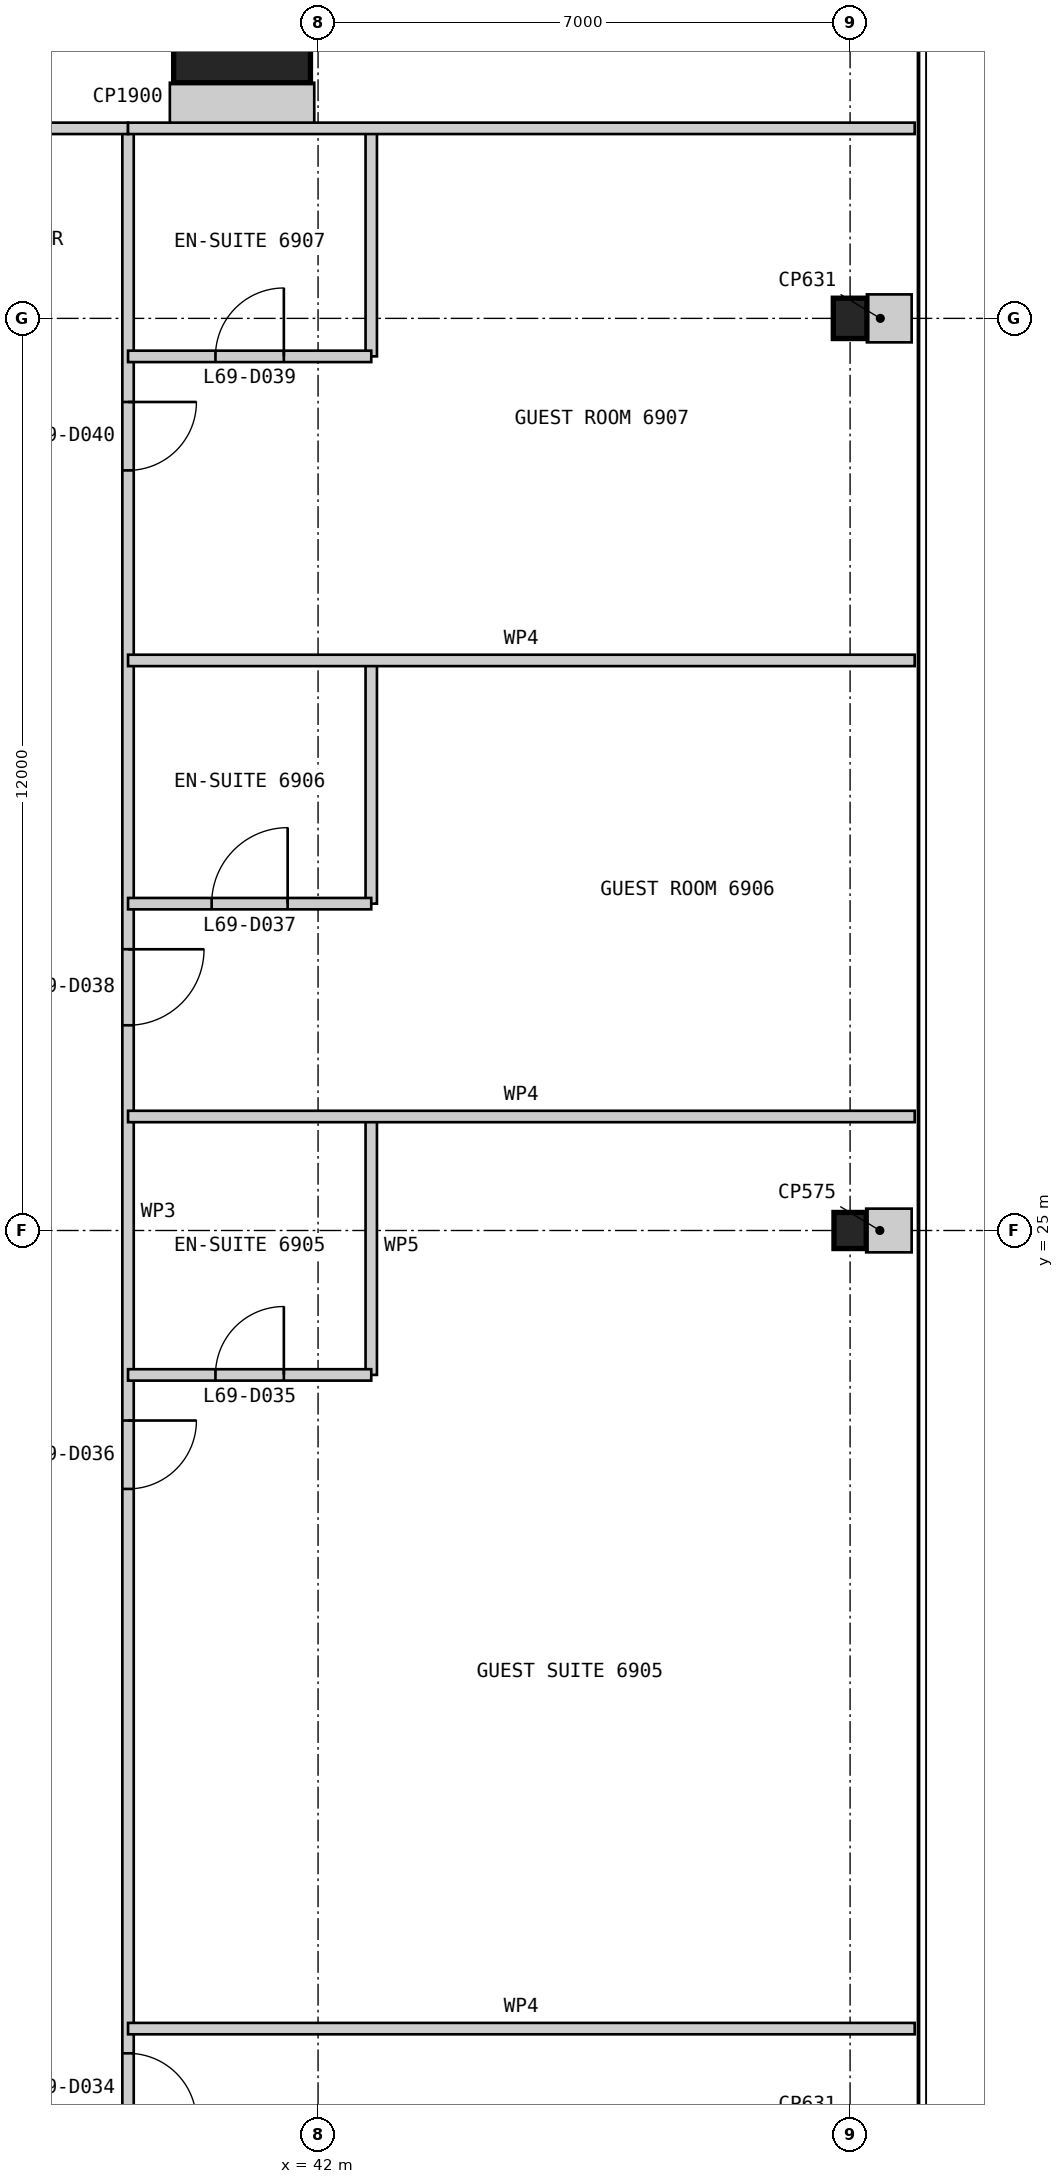
"""IFC4 building model, lengths in metres.
Left out: names, types, materials, properties, quantities, classifications, styles, units other than length and angle.
Written with IfcOpenShell. Run it as: python <this file> out.ifc"""

import sys

from ifc_helpers import new_model, si_unit, direction, frame, frame_2d, origin, origin_2d, place, context, subcontext, project, spatial, rectangle, i_section, extrude, element, fill, save


model = new_model("IFC4")
c1 = context("Model", 3, precision=1e-05, world=origin(), true_north=direction((0.0, 1.0)))
c2 = subcontext(c1, "Body", "Model", "MODEL_VIEW")
j1 = project(units=[si_unit("LENGTHUNIT", "METRE"), si_unit("PLANEANGLEUNIT", "RADIAN")], contexts=[c1])
p1 = place(None, origin())
s1 = spatial("IfcSite", under=j1, at=p1, CompositionType="ELEMENT")
p2 = place(p1, origin())
s2 = spatial("IfcBuilding", under=s1, at=p2, CompositionType="ELEMENT")
p3 = place(p2, frame((0.0, 0.0, 286.6)))
s3 = spatial("IfcBuildingStorey", under=s2, at=p3, CompositionType="ELEMENT", Elevation=286.6)
p4 = place(p3, frame((41.0, 41.0, 0.0), z_axis=(0.0, 0.0, 1.0), x_axis=(1.0, 0.0, 0.0)))
e1 = element("IfcColumn", 1, at=p4, inside=s3, PredefinedType="COLUMN", context=c2, shape_type="SweptSolid", body=[
    extrude(rectangle(XDim=1.8, YDim=1.8, at=origin_2d()), origin(), (0.0, 0.0, 1.0), 3.4),
])
p5 = place(p3, frame((49.0, 25.0, 0.0), z_axis=(0.0, 0.0, 1.0), x_axis=(1.0, 0.0, 0.0)))
e2 = element("IfcColumn", 2, at=p5, inside=s3, PredefinedType="COLUMN", context=c2, shape_type="SweptSolid", body=[
    extrude(i_section(OverallWidth=0.424, OverallDepth=0.475, WebThickness=0.048, FlangeThickness=0.077, at=origin_2d()), origin(), (0.0, 0.0, 1.0), 3.4),
])
p6 = place(p3, frame((49.0, 37.0, 0.0), z_axis=(0.0, 0.0, 1.0), x_axis=(1.0, 0.0, 0.0)))
e3 = element("IfcColumn", 3, at=p6, inside=s3, PredefinedType="COLUMN", context=c2, shape_type="SweptSolid", body=[
    extrude(i_section(OverallWidth=0.442, OverallDepth=0.531, WebThickness=0.066, FlangeThickness=0.106, at=origin_2d()), origin(), (0.0, 0.0, 1.0), 3.4),
])
p7 = place(p3, frame((39.5, 10.5, 0.0), z_axis=(0.0, 0.0, 1.0), x_axis=(0.0, 1.0, 0.0)))
e4 = element("IfcWall", 4, at=p7, inside=s3, PredefinedType="PARTITIONING", context=c2, shape_type="SweptSolid", body=[
    extrude(rectangle(XDim=29.0, YDim=0.15, at=frame_2d((14.5, 0.0))), origin(), (0.0, 0.0, 1.0), 3.25),
])
p8 = place(p7, frame((2.775, 0.0, 0.0)))
e5 = element("IfcOpeningElement", 5, at=p8, cuts=e4, PredefinedType="OPENING", context=c2, shape_type="SweptSolid", body=[
    extrude(rectangle(XDim=0.9, YDim=2.1, at=frame_2d((0.45, 1.05))), frame((0.0, 0.085, 0.0), z_axis=(0.0, -1.0, 0.0), x_axis=(1.0, 0.0, 0.0)), (0.0, 0.0, 1.0), 0.17),
])
p9 = place(p7, frame((11.1, 0.0, 0.0)))
e6 = element("IfcOpeningElement", 6, at=p9, cuts=e4, PredefinedType="OPENING", context=c2, shape_type="SweptSolid", body=[
    extrude(rectangle(XDim=0.9, YDim=2.1, at=frame_2d((0.45, 1.05))), frame((0.0, 0.085, 0.0), z_axis=(0.0, -1.0, 0.0), x_axis=(1.0, 0.0, 0.0)), (0.0, 0.0, 1.0), 0.17),
])
p10 = place(p7, frame((17.2, 0.0, 0.0)))
e7 = element("IfcOpeningElement", 7, at=p10, cuts=e4, PredefinedType="OPENING", context=c2, shape_type="SweptSolid", body=[
    extrude(rectangle(XDim=1.0, YDim=2.1, at=frame_2d((0.5, 1.05))), frame((0.0, 0.085, 0.0), z_axis=(0.0, -1.0, 0.0), x_axis=(1.0, 0.0, 0.0)), (0.0, 0.0, 1.0), 0.17),
])
p11 = place(p7, frame((24.5, 0.0, 0.0)))
e8 = element("IfcOpeningElement", 8, at=p11, cuts=e4, PredefinedType="OPENING", context=c2, shape_type="SweptSolid", body=[
    extrude(rectangle(XDim=0.9, YDim=2.1, at=frame_2d((0.45, 1.05))), frame((0.0, 0.085, 0.0), z_axis=(0.0, -1.0, 0.0), x_axis=(1.0, 0.0, 0.0)), (0.0, 0.0, 1.0), 0.17),
])
p12 = place(p3, frame((49.85, 14.5, 0.0), z_axis=(0.0, 0.0, 1.0), x_axis=(-1.0, 0.0, 0.0)))
e9 = element("IfcWall", 9, at=p12, inside=s3, PredefinedType="PARTITIONING", context=c2, shape_type="SweptSolid", body=[
    extrude(rectangle(XDim=10.35, YDim=0.15, at=frame_2d((5.175, 0.0))), origin(), (0.0, 0.0, 1.0), 3.25),
])
p13 = place(p3, frame((42.7, 23.1, 0.0), z_axis=(0.0, 0.0, 1.0), x_axis=(0.0, 1.0, 0.0)))
e10 = element("IfcWall", 10, at=p13, inside=s3, PredefinedType="PARTITIONING", context=c2, shape_type="SweptSolid", body=[
    extrude(rectangle(XDim=3.4, YDim=0.15, at=frame_2d((1.7, 0.0))), origin(), (0.0, 0.0, 1.0), 3.25),
])
p14 = place(p3, frame((42.7, 23.1, 0.0), z_axis=(0.0, 0.0, 1.0), x_axis=(-1.0, 0.0, 0.0)))
e11 = element("IfcWall", 11, at=p14, inside=s3, PredefinedType="PARTITIONING", context=c2, shape_type="SweptSolid", body=[
    extrude(rectangle(XDim=3.2, YDim=0.15, at=frame_2d((1.6, 0.0))), origin(), (0.0, 0.0, 1.0), 3.25),
])
p15 = place(p14, frame((1.15, 0.0, 0.0)))
e12 = element("IfcOpeningElement", 12, at=p15, cuts=e11, PredefinedType="OPENING", context=c2, shape_type="SweptSolid", body=[
    extrude(rectangle(XDim=0.9, YDim=2.1, at=frame_2d((0.45, 1.05))), frame((0.0, 0.085, 0.0), z_axis=(0.0, -1.0, 0.0), x_axis=(1.0, 0.0, 0.0)), (0.0, 0.0, 1.0), 0.17),
])
p16 = place(p3, frame((49.85, 26.5, 0.0), z_axis=(0.0, 0.0, 1.0), x_axis=(-1.0, 0.0, 0.0)))
e13 = element("IfcWall", 13, at=p16, inside=s3, PredefinedType="PARTITIONING", context=c2, shape_type="SweptSolid", body=[
    extrude(rectangle(XDim=10.35, YDim=0.15, at=frame_2d((5.175, 0.0))), origin(), (0.0, 0.0, 1.0), 3.25),
])
p17 = place(p3, frame((42.7, 29.3, 0.0), z_axis=(0.0, 0.0, 1.0), x_axis=(0.0, 1.0, 0.0)))
e14 = element("IfcWall", 14, at=p17, inside=s3, PredefinedType="PARTITIONING", context=c2, shape_type="SweptSolid", body=[
    extrude(rectangle(XDim=3.2, YDim=0.15, at=frame_2d((1.6, 0.0))), origin(), (0.0, 0.0, 1.0), 3.25),
])
p18 = place(p3, frame((42.7, 29.3, 0.0), z_axis=(0.0, 0.0, 1.0), x_axis=(-1.0, 0.0, 0.0)))
e15 = element("IfcWall", 15, at=p18, inside=s3, PredefinedType="PARTITIONING", context=c2, shape_type="SweptSolid", body=[
    extrude(rectangle(XDim=3.2, YDim=0.15, at=frame_2d((1.6, 0.0))), origin(), (0.0, 0.0, 1.0), 3.25),
])
p19 = place(p18, frame((1.1, 0.0, 0.0)))
e16 = element("IfcOpeningElement", 16, at=p19, cuts=e15, PredefinedType="OPENING", context=c2, shape_type="SweptSolid", body=[
    extrude(rectangle(XDim=1.0, YDim=2.1, at=frame_2d((0.5, 1.05))), frame((0.0, 0.085, 0.0), z_axis=(0.0, -1.0, 0.0), x_axis=(1.0, 0.0, 0.0)), (0.0, 0.0, 1.0), 0.17),
])
p20 = place(p3, frame((49.85, 32.5, 0.0), z_axis=(0.0, 0.0, 1.0), x_axis=(-1.0, 0.0, 0.0)))
e17 = element("IfcWall", 17, at=p20, inside=s3, PredefinedType="PARTITIONING", context=c2, shape_type="SweptSolid", body=[
    extrude(rectangle(XDim=10.35, YDim=0.15, at=frame_2d((5.175, 0.0))), origin(), (0.0, 0.0, 1.0), 3.25),
])
p21 = place(p3, frame((42.7, 36.5, 0.0), z_axis=(0.0, 0.0, 1.0), x_axis=(0.0, 1.0, 0.0)))
e18 = element("IfcWall", 18, at=p21, inside=s3, PredefinedType="PARTITIONING", context=c2, shape_type="SweptSolid", body=[
    extrude(rectangle(XDim=3.0, YDim=0.15, at=frame_2d((1.5, 0.0))), origin(), (0.0, 0.0, 1.0), 3.25),
])
p22 = place(p3, frame((42.7, 36.5, 0.0), z_axis=(0.0, 0.0, 1.0), x_axis=(-1.0, 0.0, 0.0)))
e19 = element("IfcWall", 19, at=p22, inside=s3, PredefinedType="PARTITIONING", context=c2, shape_type="SweptSolid", body=[
    extrude(rectangle(XDim=3.2, YDim=0.15, at=frame_2d((1.6, 0.0))), origin(), (0.0, 0.0, 1.0), 3.25),
])
p23 = place(p22, frame((1.15, 0.0, 0.0)))
e20 = element("IfcOpeningElement", 20, at=p23, cuts=e19, PredefinedType="OPENING", context=c2, shape_type="SweptSolid", body=[
    extrude(rectangle(XDim=0.9, YDim=2.1, at=frame_2d((0.45, 1.05))), frame((0.0, 0.085, 0.0), z_axis=(0.0, -1.0, 0.0), x_axis=(1.0, 0.0, 0.0)), (0.0, 0.0, 1.0), 0.17),
])
p24 = place(p3, frame((39.5, 39.5, 0.0), z_axis=(0.0, 0.0, 1.0), x_axis=(-1.0, 0.0, 0.0)))
e21 = element("IfcWall", 21, at=p24, inside=s3, PredefinedType="PARTITIONING", context=c2, shape_type="SweptSolid", body=[
    extrude(rectangle(XDim=29.0, YDim=0.15, at=frame_2d((14.5, 0.0))), origin(), (0.0, 0.0, 1.0), 3.25),
])
p25 = place(p24, frame((1.85, 0.0, 0.0)))
e22 = element("IfcOpeningElement", 22, at=p25, cuts=e21, PredefinedType="OPENING", context=c2, shape_type="SweptSolid", body=[
    extrude(rectangle(XDim=0.9, YDim=2.1, at=frame_2d((0.45, 1.05))), frame((0.0, 0.085, 0.0), z_axis=(0.0, -1.0, 0.0), x_axis=(1.0, 0.0, 0.0)), (0.0, 0.0, 1.0), 0.17),
])
p26 = place(p24, frame((11.5, 0.0, 0.0)))
e23 = element("IfcOpeningElement", 23, at=p26, cuts=e21, PredefinedType="OPENING", context=c2, shape_type="SweptSolid", body=[
    extrude(rectangle(XDim=0.9, YDim=2.1, at=frame_2d((0.45, 1.05))), frame((0.0, 0.085, 0.0), z_axis=(0.0, -1.0, 0.0), x_axis=(1.0, 0.0, 0.0)), (0.0, 0.0, 1.0), 0.17),
])
p27 = place(p24, frame((24.1, 0.0, 0.0)))
e24 = element("IfcOpeningElement", 24, at=p27, cuts=e21, PredefinedType="OPENING", context=c2, shape_type="SweptSolid", body=[
    extrude(rectangle(XDim=0.9, YDim=2.1, at=frame_2d((0.45, 1.05))), frame((0.0, 0.085, 0.0), z_axis=(0.0, -1.0, 0.0), x_axis=(1.0, 0.0, 0.0)), (0.0, 0.0, 1.0), 0.17),
])
p28 = place(p3, frame((49.85, 39.5, 0.0), z_axis=(0.0, 0.0, 1.0), x_axis=(-1.0, 0.0, 0.0)))
e25 = element("IfcWall", 25, at=p28, inside=s3, PredefinedType="PARTITIONING", context=c2, shape_type="SweptSolid", body=[
    extrude(rectangle(XDim=10.35, YDim=0.15, at=frame_2d((5.175, 0.0))), origin(), (0.0, 0.0, 1.0), 3.25),
])
p29 = place(p3, frame((49.81, 25.0, 0.0), z_axis=(0.0, 0.0, 1.0), x_axis=(-1.0, 0.0, 0.0)))
e26 = element("IfcWall", 26, at=p29, inside=s3, PredefinedType="PARTITIONING", context=c2, shape_type="SweptSolid", body=[
    extrude(rectangle(XDim=0.598, YDim=0.575, at=frame_2d((0.299, 0.0))), origin(), (0.0, 0.0, 1.0), 3.25),
])
p30 = place(p3, frame((49.81, 37.0, 0.0), z_axis=(0.0, 0.0, 1.0), x_axis=(-1.0, 0.0, 0.0)))
e27 = element("IfcWall", 27, at=p30, inside=s3, PredefinedType="PARTITIONING", context=c2, shape_type="SweptSolid", body=[
    extrude(rectangle(XDim=0.589, YDim=0.631, at=frame_2d((0.294, 0.0))), origin(), (0.0, 0.0, 1.0), 3.25),
])
p31 = place(p3, frame((41.0, 39.575, 0.0), z_axis=(0.0, 0.0, 1.0), x_axis=(0.0, 1.0, 0.0)))
e28 = element("IfcWall", 28, at=p31, inside=s3, PredefinedType="PARTITIONING", context=c2, shape_type="SweptSolid", body=[
    extrude(rectangle(XDim=0.525, YDim=1.9, at=frame_2d((0.263, 0.0))), origin(), (0.0, 0.0, 1.0), 3.25),
])
p32 = place(p8, frame((0.9, 0.0, 0.0), z_axis=(0.0, 0.0, 1.0), x_axis=(-1.0, 0.0, 0.0)))
e29 = element("IfcDoor", 29, at=p32, inside=s3, OperationType="SINGLE_SWING_RIGHT", PredefinedType="DOOR", context=c2, shape_type="SweptSolid", body=[
    extrude(rectangle(XDim=0.9, YDim=2.1, at=frame_2d((0.45, 1.05))), frame((0.0, 0.025, 0.0), z_axis=(0.0, -1.0, 0.0), x_axis=(1.0, 0.0, 0.0)), (0.0, 0.0, 1.0), 0.05),
])
fill(e5, e29)
p33 = place(p15, frame((0.9, 0.0, 0.0), z_axis=(0.0, 0.0, 1.0), x_axis=(-1.0, 0.0, 0.0)))
e30 = element("IfcDoor", 30, at=p33, inside=s3, OperationType="SINGLE_SWING_RIGHT", PredefinedType="DOOR", context=c2, shape_type="SweptSolid", body=[
    extrude(rectangle(XDim=0.9, YDim=2.1, at=frame_2d((0.45, 1.05))), frame((0.0, 0.025, 0.0), z_axis=(0.0, -1.0, 0.0), x_axis=(1.0, 0.0, 0.0)), (0.0, 0.0, 1.0), 0.05),
])
fill(e12, e30)
p34 = place(p9, frame((0.9, 0.0, 0.0), z_axis=(0.0, 0.0, 1.0), x_axis=(-1.0, 0.0, 0.0)))
e31 = element("IfcDoor", 31, at=p34, inside=s3, OperationType="SINGLE_SWING_LEFT", PredefinedType="DOOR", context=c2, shape_type="SweptSolid", body=[
    extrude(rectangle(XDim=0.9, YDim=2.1, at=frame_2d((0.45, 1.05))), frame((0.0, 0.025, 0.0), z_axis=(0.0, -1.0, 0.0), x_axis=(1.0, 0.0, 0.0)), (0.0, 0.0, 1.0), 0.05),
])
fill(e6, e31)
p35 = place(p19, frame((1.0, 0.0, 0.0), z_axis=(0.0, 0.0, 1.0), x_axis=(-1.0, 0.0, 0.0)))
e32 = element("IfcDoor", 32, at=p35, inside=s3, OperationType="SINGLE_SWING_RIGHT", PredefinedType="DOOR", context=c2, shape_type="SweptSolid", body=[
    extrude(rectangle(XDim=1.0, YDim=2.1, at=frame_2d((0.5, 1.05))), frame((0.0, 0.025, 0.0), z_axis=(0.0, -1.0, 0.0), x_axis=(1.0, 0.0, 0.0)), (0.0, 0.0, 1.0), 0.05),
])
fill(e16, e32)
p36 = place(p10, frame((1.0, 0.0, 0.0), z_axis=(0.0, 0.0, 1.0), x_axis=(-1.0, 0.0, 0.0)))
e33 = element("IfcDoor", 33, at=p36, inside=s3, OperationType="SINGLE_SWING_LEFT", PredefinedType="DOOR", context=c2, shape_type="SweptSolid", body=[
    extrude(rectangle(XDim=1.0, YDim=2.1, at=frame_2d((0.5, 1.05))), frame((0.0, 0.025, 0.0), z_axis=(0.0, -1.0, 0.0), x_axis=(1.0, 0.0, 0.0)), (0.0, 0.0, 1.0), 0.05),
])
fill(e7, e33)
p37 = place(p23, frame((0.9, 0.0, 0.0), z_axis=(0.0, 0.0, 1.0), x_axis=(-1.0, 0.0, 0.0)))
e34 = element("IfcDoor", 34, at=p37, inside=s3, OperationType="SINGLE_SWING_RIGHT", PredefinedType="DOOR", context=c2, shape_type="SweptSolid", body=[
    extrude(rectangle(XDim=0.9, YDim=2.1, at=frame_2d((0.45, 1.05))), frame((0.0, 0.025, 0.0), z_axis=(0.0, -1.0, 0.0), x_axis=(1.0, 0.0, 0.0)), (0.0, 0.0, 1.0), 0.05),
])
fill(e20, e34)
p38 = place(p11, frame((0.9, 0.0, 0.0), z_axis=(0.0, 0.0, 1.0), x_axis=(-1.0, 0.0, 0.0)))
e35 = element("IfcDoor", 35, at=p38, inside=s3, OperationType="SINGLE_SWING_LEFT", PredefinedType="DOOR", context=c2, shape_type="SweptSolid", body=[
    extrude(rectangle(XDim=0.9, YDim=2.1, at=frame_2d((0.45, 1.05))), frame((0.0, 0.025, 0.0), z_axis=(0.0, -1.0, 0.0), x_axis=(1.0, 0.0, 0.0)), (0.0, 0.0, 1.0), 0.05),
])
fill(e8, e35)
save(model, sys.argv[1])
